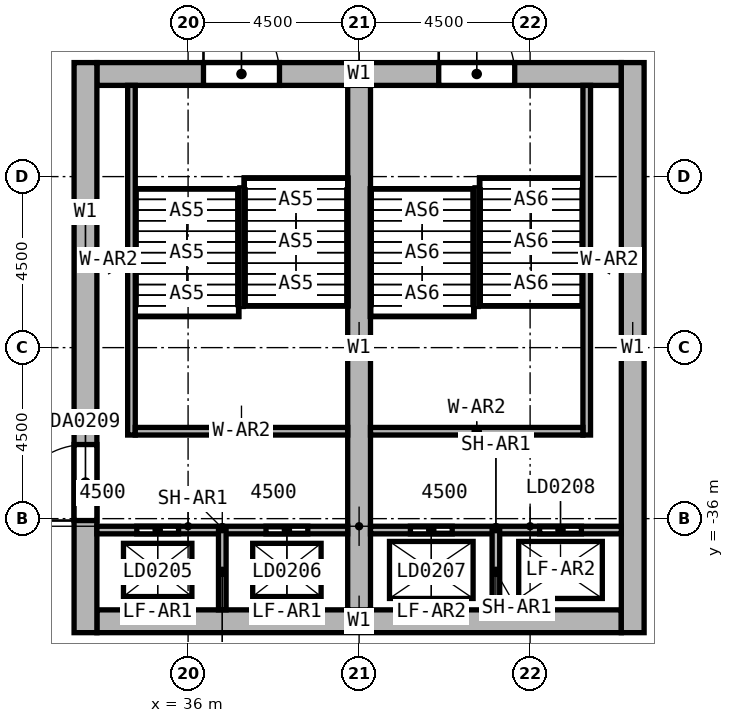
"""IFC4 building model, lengths in metres.
Left out: names, types, materials, properties, quantities, classifications, styles, units other than length and angle.
Written with IfcOpenShell. Run it as: python <this file> out.ifc"""

import sys

from ifc_helpers import new_model, si_unit, direction, frame, frame_2d, origin, place, context, subcontext, project, spatial, rectangle, extrude, element, fill, save


model = new_model("IFC4")
c1 = context("Model", 3, precision=1e-05, world=origin(), true_north=direction((0.0, 1.0)))
c2 = subcontext(c1, "Body", "Model", "MODEL_VIEW")
j1 = project(units=[si_unit("LENGTHUNIT", "METRE"), si_unit("PLANEANGLEUNIT", "RADIAN")], contexts=[c1])
p1 = place(None, origin())
s1 = spatial("IfcSite", under=j1, at=p1, CompositionType="ELEMENT")
p2 = place(p1, origin())
s2 = spatial("IfcBuilding", under=s1, at=p2, CompositionType="ELEMENT")
p3 = place(p2, origin())
s3 = spatial("IfcBuildingStorey", under=s2, at=p3, CompositionType="ELEMENT", Elevation=0.0)
p4 = place(p3, frame((33.6, -24.3, 0.0), z_axis=(0.0, 0.0, 1.0), x_axis=(1.0, 0.0, 0.0)))
e1 = element("IfcWall", 1, at=p4, inside=s3, PredefinedType="SHEAR", context=c2, shape_type="SweptSolid", body=[
    extrude(rectangle(XDim=13.8, YDim=0.6, at=frame_2d((6.9, 0.0))), origin(), (0.0, 0.0, 1.0), 12.0),
])
p5 = place(p4, frame((2.805, 0.0, 0.0)))
e2 = element("IfcOpeningElement", 2, at=p5, cuts=e1, PredefinedType="OPENING", context=c2, shape_type="SweptSolid", body=[
    extrude(rectangle(XDim=2.0, YDim=2.4, at=frame_2d((1.0, 1.2))), frame((0.0, 0.3, 0.0), z_axis=(0.0, -1.0, 0.0), x_axis=(1.0, 0.0, 0.0)), (0.0, 0.0, 1.0), 0.6),
])
p6 = place(p4, frame((8.995, 0.0, 0.0)))
e3 = element("IfcOpeningElement", 3, at=p6, cuts=e1, PredefinedType="OPENING", context=c2, shape_type="SweptSolid", body=[
    extrude(rectangle(XDim=2.0, YDim=2.4, at=frame_2d((1.0, 1.2))), frame((0.0, 0.3, 0.0), z_axis=(0.0, -1.0, 0.0), x_axis=(1.0, 0.0, 0.0)), (0.0, 0.0, 1.0), 0.6),
])
p7 = place(p3, frame((33.6, -38.7, 0.0), z_axis=(0.0, 0.0, 1.0), x_axis=(1.0, 0.0, 0.0)))
e4 = element("IfcWall", 4, at=p7, inside=s3, PredefinedType="SHEAR", context=c2, shape_type="SweptSolid", body=[
    extrude(rectangle(XDim=13.8, YDim=0.6, at=frame_2d((6.9, 0.0))), origin(), (0.0, 0.0, 1.0), 12.0),
])
p8 = place(p3, frame((33.3, -39.0, 0.0), z_axis=(0.0, 0.0, 1.0), x_axis=(0.0, 1.0, 0.0)))
e5 = element("IfcWall", 5, at=p8, inside=s3, PredefinedType="SHEAR", context=c2, shape_type="SweptSolid", body=[
    extrude(rectangle(XDim=15.0, YDim=0.6, at=frame_2d((7.5, 0.0))), origin(), (0.0, 0.0, 1.0), 12.0),
])
p9 = place(p8, frame((2.95, 0.0, 0.0)))
e6 = element("IfcOpeningElement", 6, at=p9, cuts=e5, PredefinedType="OPENING", context=c2, shape_type="SweptSolid", body=[
    extrude(rectangle(XDim=2.0, YDim=2.4, at=frame_2d((1.0, 1.2))), frame((0.0, 0.3, 0.0), z_axis=(0.0, -1.0, 0.0), x_axis=(1.0, 0.0, 0.0)), (0.0, 0.0, 1.0), 0.6),
])
p10 = place(p3, frame((47.7, -39.0, 0.0), z_axis=(0.0, 0.0, 1.0), x_axis=(0.0, 1.0, 0.0)))
e7 = element("IfcWall", 7, at=p10, inside=s3, PredefinedType="SHEAR", context=c2, shape_type="SweptSolid", body=[
    extrude(rectangle(XDim=15.0, YDim=0.6, at=frame_2d((7.5, 0.0))), origin(), (0.0, 0.0, 1.0), 12.0),
])
p11 = place(p3, frame((40.5, -38.4, 0.0), z_axis=(0.0, 0.0, 1.0), x_axis=(0.0, 1.0, 0.0)))
e8 = element("IfcWall", 8, at=p11, inside=s3, PredefinedType="SHEAR", context=c2, shape_type="SweptSolid", body=[
    extrude(rectangle(XDim=13.8, YDim=0.6, at=frame_2d((6.9, 0.0))), origin(), (0.0, 0.0, 1.0), 12.0),
])
p12 = place(p3, frame((34.51, -33.8, 0.0), z_axis=(0.0, 0.0, 1.0), x_axis=(0.0, 1.0, 0.0)))
e9 = element("IfcWall", 9, at=p12, inside=s3, PredefinedType="SOLIDWALL", context=c2, shape_type="SweptSolid", body=[
    extrude(rectangle(XDim=9.2, YDim=0.2, at=frame_2d((4.6, 0.0))), origin(), (0.0, 0.0, 1.0), 12.0),
])
p13 = place(p3, frame((34.61, -33.7, 0.0), z_axis=(0.0, 0.0, 1.0), x_axis=(1.0, 0.0, 0.0)))
e10 = element("IfcWall", 10, at=p13, inside=s3, PredefinedType="SOLIDWALL", context=c2, shape_type="SweptSolid", body=[
    extrude(rectangle(XDim=5.59, YDim=0.2, at=frame_2d((2.795, 0.0))), origin(), (0.0, 0.0, 1.0), 12.0),
])
p14 = place(p3, frame((46.49, -33.8, 0.0), z_axis=(0.0, 0.0, 1.0), x_axis=(0.0, 1.0, 0.0)))
e11 = element("IfcWall", 11, at=p14, inside=s3, PredefinedType="SOLIDWALL", context=c2, shape_type="SweptSolid", body=[
    extrude(rectangle(XDim=9.2, YDim=0.2, at=frame_2d((4.6, 0.0))), origin(), (0.0, 0.0, 1.0), 12.0),
])
p15 = place(p3, frame((40.8, -33.7, 0.0), z_axis=(0.0, 0.0, 1.0), x_axis=(1.0, 0.0, 0.0)))
e12 = element("IfcWall", 12, at=p15, inside=s3, PredefinedType="SOLIDWALL", context=c2, shape_type="SweptSolid", body=[
    extrude(rectangle(XDim=5.59, YDim=0.2, at=frame_2d((2.795, 0.0))), origin(), (0.0, 0.0, 1.0), 12.0),
])
p16 = place(p3, frame((33.6, -36.3, 0.0), z_axis=(0.0, 0.0, 1.0), x_axis=(1.0, 0.0, 0.0)))
e13 = element("IfcWall", 13, at=p16, inside=s3, PredefinedType="SHEAR", context=c2, shape_type="SweptSolid", body=[
    extrude(rectangle(XDim=6.6, YDim=0.2, at=frame_2d((3.3, 0.0))), origin(), (0.0, 0.0, 1.0), 12.0),
])
p17 = place(p16, frame((1.05, 0.0, 0.0)))
e14 = element("IfcOpeningElement", 14, at=p17, cuts=e13, PredefinedType="OPENING", context=c2, shape_type="SweptSolid", body=[
    extrude(rectangle(XDim=1.1, YDim=2.4, at=frame_2d((0.55, 1.2))), frame((0.0, 0.1, 0.0), z_axis=(0.0, -1.0, 0.0), x_axis=(1.0, 0.0, 0.0)), (0.0, 0.0, 1.0), 0.2),
])
p18 = place(p16, frame((4.45, 0.0, 0.0)))
e15 = element("IfcOpeningElement", 15, at=p18, cuts=e13, PredefinedType="OPENING", context=c2, shape_type="SweptSolid", body=[
    extrude(rectangle(XDim=1.1, YDim=2.4, at=frame_2d((0.55, 1.2))), frame((0.0, 0.1, 0.0), z_axis=(0.0, -1.0, 0.0), x_axis=(1.0, 0.0, 0.0)), (0.0, 0.0, 1.0), 0.2),
])
p19 = place(p3, frame((40.8, -36.3, 0.0), z_axis=(0.0, 0.0, 1.0), x_axis=(1.0, 0.0, 0.0)))
e16 = element("IfcWall", 16, at=p19, inside=s3, PredefinedType="SHEAR", context=c2, shape_type="SweptSolid", body=[
    extrude(rectangle(XDim=6.6, YDim=0.2, at=frame_2d((3.3, 0.0))), origin(), (0.0, 0.0, 1.0), 12.0),
])
p20 = place(p19, frame((1.05, 0.0, 0.0)))
e17 = element("IfcOpeningElement", 17, at=p20, cuts=e16, PredefinedType="OPENING", context=c2, shape_type="SweptSolid", body=[
    extrude(rectangle(XDim=1.1, YDim=2.4, at=frame_2d((0.55, 1.2))), frame((0.0, 0.1, 0.0), z_axis=(0.0, -1.0, 0.0), x_axis=(1.0, 0.0, 0.0)), (0.0, 0.0, 1.0), 0.2),
])
p21 = place(p19, frame((4.45, 0.0, 0.0)))
e18 = element("IfcOpeningElement", 18, at=p21, cuts=e16, PredefinedType="OPENING", context=c2, shape_type="SweptSolid", body=[
    extrude(rectangle(XDim=1.1, YDim=2.4, at=frame_2d((0.55, 1.2))), frame((0.0, 0.1, 0.0), z_axis=(0.0, -1.0, 0.0), x_axis=(1.0, 0.0, 0.0)), (0.0, 0.0, 1.0), 0.2),
])
for number, where, z_axis, x_axis in (
    (19, (36.9, -38.4, 0.0), (0.0, 0.0, 1.0), (0.0, 1.0, 0.0)),
    (20, (44.1, -38.4, 0.0), (0.0, 0.0, 1.0), (0.0, 1.0, 0.0)),
):
    element("IfcWall", number, at=place(p3, frame(where, z_axis=z_axis, x_axis=x_axis)), inside=s3, PredefinedType="SHEAR", context=c2, shape_type="SweptSolid", body=[
        extrude(rectangle(XDim=2.1, YDim=0.2, at=frame_2d((1.05, 0.0))), origin(), (0.0, 0.0, 1.0), 12.0),
    ])
p22 = place(p5, origin())
e21 = element("IfcDoor", 21, at=p22, inside=s3, OperationType="DOUBLE_DOOR_SINGLE_SWING", PredefinedType="DOOR", context=c2, shape_type="SweptSolid", body=[
    extrude(rectangle(XDim=2.0, YDim=2.4, at=frame_2d((1.0, 1.2))), frame((0.0, 0.025, 0.0), z_axis=(0.0, -1.0, 0.0), x_axis=(1.0, 0.0, 0.0)), (0.0, 0.0, 1.0), 0.05),
])
fill(e2, e21)
p23 = place(p6, origin())
e22 = element("IfcDoor", 22, at=p23, inside=s3, OperationType="DOUBLE_DOOR_SINGLE_SWING", PredefinedType="DOOR", context=c2, shape_type="SweptSolid", body=[
    extrude(rectangle(XDim=2.0, YDim=2.4, at=frame_2d((1.0, 1.2))), frame((0.0, 0.025, 0.0), z_axis=(0.0, -1.0, 0.0), x_axis=(1.0, 0.0, 0.0)), (0.0, 0.0, 1.0), 0.05),
])
fill(e3, e22)
p24 = place(p17, frame((1.1, 0.0, 0.0), z_axis=(0.0, 0.0, 1.0), x_axis=(-1.0, 0.0, 0.0)))
e23 = element("IfcDoor", 23, at=p24, inside=s3, OperationType="DOUBLE_DOOR_SLIDING", PredefinedType="DOOR", context=c2, shape_type="SweptSolid", body=[
    extrude(rectangle(XDim=1.1, YDim=2.4, at=frame_2d((0.55, 1.2))), frame((0.0, 0.025, 0.0), z_axis=(0.0, -1.0, 0.0), x_axis=(1.0, 0.0, 0.0)), (0.0, 0.0, 1.0), 0.05),
])
fill(e14, e23)
p25 = place(p18, frame((1.1, 0.0, 0.0), z_axis=(0.0, 0.0, 1.0), x_axis=(-1.0, 0.0, 0.0)))
e24 = element("IfcDoor", 24, at=p25, inside=s3, OperationType="DOUBLE_DOOR_SLIDING", PredefinedType="DOOR", context=c2, shape_type="SweptSolid", body=[
    extrude(rectangle(XDim=1.1, YDim=2.4, at=frame_2d((0.55, 1.2))), frame((0.0, 0.025, 0.0), z_axis=(0.0, -1.0, 0.0), x_axis=(1.0, 0.0, 0.0)), (0.0, 0.0, 1.0), 0.05),
])
fill(e15, e24)
p26 = place(p20, frame((1.1, 0.0, 0.0), z_axis=(0.0, 0.0, 1.0), x_axis=(-1.0, 0.0, 0.0)))
e25 = element("IfcDoor", 25, at=p26, inside=s3, OperationType="DOUBLE_DOOR_SLIDING", PredefinedType="DOOR", context=c2, shape_type="SweptSolid", body=[
    extrude(rectangle(XDim=1.1, YDim=2.4, at=frame_2d((0.55, 1.2))), frame((0.0, 0.025, 0.0), z_axis=(0.0, -1.0, 0.0), x_axis=(1.0, 0.0, 0.0)), (0.0, 0.0, 1.0), 0.05),
])
fill(e17, e25)
p27 = place(p21, frame((1.1, 0.0, 0.0), z_axis=(0.0, 0.0, 1.0), x_axis=(-1.0, 0.0, 0.0)))
e26 = element("IfcDoor", 26, at=p27, inside=s3, OperationType="DOUBLE_DOOR_SLIDING", PredefinedType="DOOR", context=c2, shape_type="SweptSolid", body=[
    extrude(rectangle(XDim=1.1, YDim=2.4, at=frame_2d((0.55, 1.2))), frame((0.0, 0.025, 0.0), z_axis=(0.0, -1.0, 0.0), x_axis=(1.0, 0.0, 0.0)), (0.0, 0.0, 1.0), 0.05),
])
fill(e18, e26)
p28 = place(p9, origin())
e27 = element("IfcDoor", 27, at=p28, inside=s3, OperationType="DOUBLE_DOOR_SINGLE_SWING", PredefinedType="DOOR", context=c2, shape_type="SweptSolid", body=[
    extrude(rectangle(XDim=2.0, YDim=2.4, at=frame_2d((1.0, 1.2))), frame((0.0, 0.025, 0.0), z_axis=(0.0, -1.0, 0.0), x_axis=(1.0, 0.0, 0.0)), (0.0, 0.0, 1.0), 0.05),
])
fill(e6, e27)
save(model, sys.argv[1])
